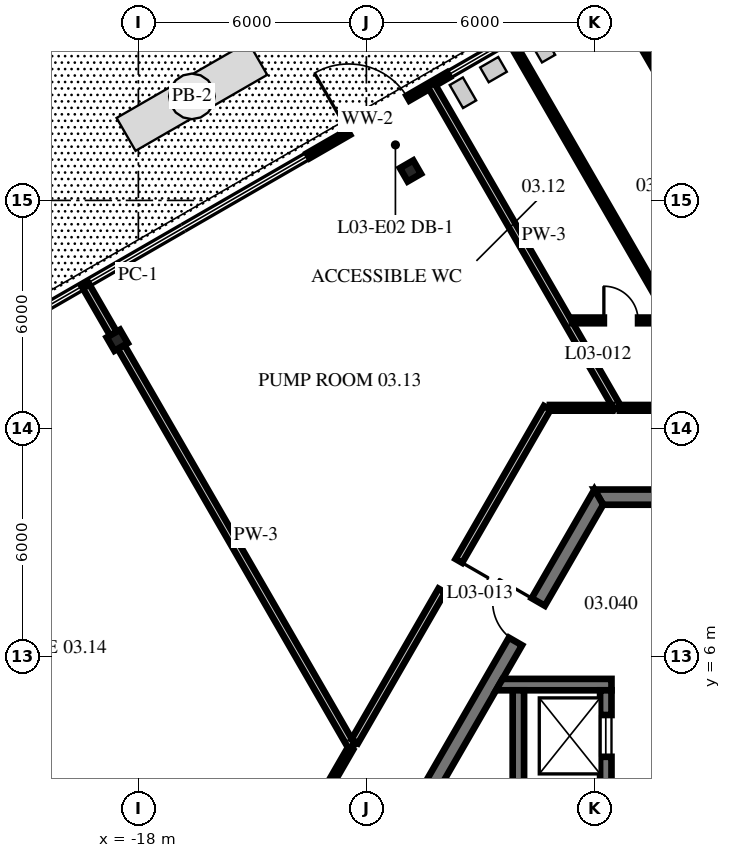
"""IFC4 building model, lengths in metres.
Left out: names, types, materials, properties, quantities, classifications, styles, units other than length and angle.
Written with IfcOpenShell. Run it as: python <this file> out.ifc"""

import sys

from ifc_helpers import new_model, si_unit, direction, frame, frame_2d, origin, origin_2d, place, context, subcontext, project, spatial, polyline, rectangle, i_section, outline, extrude, source, transform, mapped, element, fill, save


model = new_model("IFC4")
c1 = context("Model", 3, precision=1e-05, world=origin(), true_north=direction((0.0, 1.0)))
c2 = subcontext(c1, "Body", "Model", "MODEL_VIEW")
j1 = project(units=[si_unit("LENGTHUNIT", "METRE"), si_unit("PLANEANGLEUNIT", "RADIAN")], contexts=[c1])
p1 = place(None, origin())
s1 = spatial("IfcSite", under=j1, at=p1, CompositionType="ELEMENT")
p2 = place(p1, origin())
s2 = spatial("IfcBuilding", under=s1, at=p2, CompositionType="ELEMENT")
p3 = place(p2, frame((0.0, 0.0, 16.0)))
s3 = spatial("IfcBuildingStorey", under=s2, at=p3, CompositionType="ELEMENT", Elevation=16.0)
m1 = source(origin(), c2, "Body", "SweptSolid", [
    extrude(i_section(OverallWidth=0.404, OverallDepth=0.406, WebThickness=0.027, FlangeThickness=0.044, at=origin_2d()), origin(), (0.0, 0.0, 1.0), 4.3),
])
for number, where, z_axis, x_axis in (
    (1, (-10.84, 18.775, 0.0), (0.0, 0.0, 1.0), (-0.866, -0.5, 0.0)),
    (2, (-18.556, 14.32, 0.0), (0.0, 0.0, 1.0), (-0.866, -0.5, 0.0)),
):
    element("IfcColumn", number, at=place(p3, frame(where, z_axis=z_axis, x_axis=x_axis)), inside=s3, PredefinedType="COLUMN", context=c2, shape_type="MappedRepresentation", body=[
        mapped(m1, transform((0.0, 0.0, 0.0), scale=1.0)),
    ])
m2 = source(origin(), c2, "Body", "SweptSolid", [
    extrude(outline(polyline([(-0.115, -0.2), (11.885, -0.2), (11.654, 0.2), (0.115, 0.2), (-0.115, -0.2)])), origin(), (0.0, 0.0, 1.0), 4.1),
])
p4 = place(p3, frame((5.885, 10.192, 0.0), z_axis=(0.0, 0.0, 1.0), x_axis=(-1.0, 0.0, 0.0)))
e3 = element("IfcWall", 3, at=p4, inside=s3, PredefinedType="SHEAR", context=c2, shape_type="MappedRepresentation", body=[
    mapped(m2, transform((0.0, 0.0, 0.0), scale=1.0)),
])
p5 = place(p4, frame((7.985, 0.0, 0.0)))
e4 = element("IfcOpeningElement", 4, at=p5, cuts=e3, PredefinedType="OPENING", context=c2, shape_type="SweptSolid", body=[
    extrude(rectangle(XDim=1.2, YDim=2.1, at=frame_2d((0.6, 1.05))), frame((0.0, 0.21, 0.0), z_axis=(0.0, -1.0, 0.0), x_axis=(1.0, 0.0, 0.0)), (0.0, 0.0, 1.0), 0.42),
])
p6 = place(p3, frame((-5.885, 10.192, 0.0), z_axis=(0.0, 0.0, 1.0), x_axis=(-0.499996592174, -0.866027371285, 0.0)))
e5 = element("IfcWall", 5, at=p6, inside=s3, PredefinedType="SHEAR", context=c2, shape_type="MappedRepresentation", body=[
    mapped(m2, transform((0.0, 0.0, 0.0), scale=1.0)),
])
p7 = place(p6, frame((3.185, 0.0, 0.0)))
e6 = element("IfcOpeningElement", 6, at=p7, cuts=e5, PredefinedType="OPENING", context=c2, shape_type="SweptSolid", body=[
    extrude(rectangle(XDim=1.2, YDim=2.1, at=frame_2d((0.6, 1.05))), frame((0.0, 0.21, 0.0), z_axis=(0.0, -1.0, 0.0), x_axis=(1.0, 0.0, 0.0)), (0.0, 0.0, 1.0), 0.42),
])
m3 = source(origin(), c2, "Body", "SweptSolid", [
    extrude(outline(polyline([(2.6, -0.15), (-0.44, -0.15), (-0.267, 0.15), (2.6, 0.15), (2.6, -0.15)])), origin(), (0.0, 0.0, 1.0), 4.1),
])
p8 = place(p3, frame((-8.15, 5.26, 0.0), z_axis=(0.0, 0.0, 1.0), x_axis=(1.0, 0.0, 0.0)))
e7 = element("IfcWall", 7, at=p8, inside=s3, PredefinedType="SHEAR", context=c2, shape_type="MappedRepresentation", body=[
    mapped(m3, transform((0.0, 0.0, 0.0), scale=1.0)),
])
m4 = source(origin(), c2, "Body", "SweptSolid", [
    extrude(rectangle(XDim=2.4, YDim=0.3, at=frame_2d((1.2, 0.0))), origin(), (0.0, 0.0, 1.0), 4.1),
])
p9 = place(p3, frame((-8.0, 2.71, 0.0), z_axis=(0.0, 0.0, 1.0), x_axis=(0.0, 1.0, 0.0)))
e8 = element("IfcWall", 8, at=p9, inside=s3, PredefinedType="SHEAR", context=c2, shape_type="MappedRepresentation", body=[
    mapped(m4, transform((0.0, 0.0, 0.0), scale=1.0)),
])
p10 = place(p3, frame((-5.7, 2.71, 0.0), z_axis=(0.0, 0.0, 1.0), x_axis=(0.0, 1.0, 0.0)))
e9 = element("IfcWall", 9, at=p10, inside=s3, PredefinedType="SHEAR", context=c2, shape_type="MappedRepresentation", body=[
    mapped(m4, transform((0.0, 0.0, 0.0), scale=1.0)),
])
p11 = place(p10, frame((0.65, 0.0, 0.0)))
e10 = element("IfcOpeningElement", 10, at=p11, cuts=e9, PredefinedType="OPENING", context=c2, shape_type="SweptSolid", body=[
    extrude(rectangle(XDim=1.1, YDim=2.1, at=frame_2d((0.55, 1.05))), frame((0.0, 0.16, 0.0), z_axis=(0.0, -1.0, 0.0), x_axis=(1.0, 0.0, 0.0)), (0.0, 0.0, 1.0), 0.32),
])
m5 = source(origin(), c2, "Body", "SweptSolid", [
    extrude(rectangle(XDim=4.263, YDim=0.15, at=frame_2d((2.131, 0.0))), origin(), (0.0, 0.0, 1.0), 4.1),
])
p12 = place(p3, frame((-13.531, 19.175, 0.0), z_axis=(0.0, 0.0, 1.0), x_axis=(0.8660282166, 0.499995128029, 0.0)))
e11 = element("IfcWall", 11, at=p12, inside=s3, PredefinedType="ELEMENTEDWALL", context=c2, shape_type="MappedRepresentation", body=[
    mapped(m5, transform((0.0, 0.0, 0.0), scale=1.0)),
])
p13 = place(p12, frame((1.231, 0.0, 0.0)))
e12 = element("IfcOpeningElement", 12, at=p13, cuts=e11, PredefinedType="OPENING", context=c2, shape_type="SweptSolid", body=[
    extrude(rectangle(XDim=1.8, YDim=2.4, at=frame_2d((0.9, 1.2))), frame((0.0, 0.085, 0.0), z_axis=(0.0, -1.0, 0.0), x_axis=(1.0, 0.0, 0.0)), (0.0, 0.0, 1.0), 0.17),
])
m6 = source(origin(), c2, "Body", "SweptSolid", [
    extrude(rectangle(XDim=1.499, YDim=0.2, at=frame_2d((0.749, 0.0))), origin(), (0.0, 0.0, 1.0), 4.1),
])
p14 = place(p3, frame((-19.402, 15.785, 0.0), z_axis=(0.0, 0.0, 1.0), x_axis=(0.499976292358, -0.866039090965, 0.0)))
e13 = element("IfcWall", 13, at=p14, inside=s3, PredefinedType="PARTITIONING", context=c2, shape_type="MappedRepresentation", body=[
    mapped(m6, transform((0.0, 0.0, 0.0), scale=1.0)),
])
m7 = source(origin(), c2, "Body", "SweptSolid", [
    extrude(rectangle(XDim=12.148, YDim=0.2, at=frame_2d((6.074, 0.0))), origin(), (0.0, 0.0, 1.0), 3.343),
])
p15 = place(p3, frame((-18.459, 14.153, 0.0), z_axis=(0.0, 0.0, 1.0), x_axis=(0.500006022464, -0.866021926685, 0.0)))
e14 = element("IfcWall", 14, at=p15, inside=s3, PredefinedType="PARTITIONING", context=c2, shape_type="MappedRepresentation", body=[
    mapped(m7, transform((0.0, 0.0, 0.0), scale=1.0)),
])
m8 = source(origin(), c2, "Body", "SweptSolid", [
    extrude(rectangle(XDim=9.813, YDim=0.2, at=frame_2d((4.906, 0.0))), origin(), (0.0, 0.0, 1.0), 4.1),
])
p16 = place(p3, frame((-10.3, 21.04, 0.0), z_axis=(0.0, 0.0, 1.0), x_axis=(0.49999238347, -0.866029801145, 0.0)))
e15 = element("IfcWall", 15, at=p16, inside=s3, PredefinedType="PARTITIONING", context=c2, shape_type="MappedRepresentation", body=[
    mapped(m8, transform((0.0, 0.0, 0.0), scale=1.0)),
])
p17 = place(p3, frame((-8.222, 22.24, 0.0), z_axis=(0.0, 0.0, 1.0), x_axis=(0.500002832459, -0.866023768457, 0.0)))
e16 = element("IfcWall", 16, at=p17, inside=s3, PredefinedType="PARTITIONING", context=c2, shape_type="SweptSolid", body=[
    extrude(rectangle(XDim=8.542, YDim=0.15, at=frame_2d((4.271, 0.0))), origin(), (0.0, 0.0, 1.0), 4.1),
])
p18 = place(p3, frame((-5.67, 23.713, 0.0), z_axis=(0.0, 0.0, 1.0), x_axis=(0.500017481723, -0.866015310472, 0.0)))
e17 = element("IfcWall", 17, at=p18, inside=s3, PredefinedType="PARTITIONING", context=c2, shape_type="SweptSolid", body=[
    extrude(rectangle(XDim=10.243, YDim=0.15, at=frame_2d((5.122, 0.0))), origin(), (0.0, 0.0, 1.0), 4.1),
])
p19 = place(p3, frame((-7.171, 12.542, 0.0), z_axis=(0.0, 0.0, 1.0), x_axis=(1.0, 0.0, 0.0)))
e18 = element("IfcWall", 18, at=p19, inside=s3, PredefinedType="PARTITIONING", context=c2, shape_type="SweptSolid", body=[
    extrude(rectangle(XDim=1.641, YDim=0.15, at=frame_2d((0.821, 0.0))), origin(), (0.0, 0.0, 1.0), 4.1),
])
p20 = place(p3, frame((-5.33, 12.542, 0.0), z_axis=(0.0, 0.0, 1.0), x_axis=(1.0, 0.0, 0.0)))
e19 = element("IfcWall", 19, at=p20, inside=s3, PredefinedType="PARTITIONING", context=c2, shape_type="SweptSolid", body=[
    extrude(rectangle(XDim=8.244, YDim=0.15, at=frame_2d((4.122, 0.0))), origin(), (0.0, 0.0, 1.0), 4.1),
])
p21 = place(p20, frame((3.727, 0.0, 0.0)))
e20 = element("IfcOpeningElement", 20, at=p21, cuts=e19, PredefinedType="OPENING", context=c2, shape_type="SweptSolid", body=[
    extrude(rectangle(XDim=0.9, YDim=2.1, at=frame_2d((0.45, 1.05))), frame((0.0, 0.085, 0.0), z_axis=(0.0, -1.0, 0.0), x_axis=(1.0, 0.0, 0.0)), (0.0, 0.0, 1.0), 0.17),
])
p22 = place(p3, frame((-6.592, 14.842, 0.0), z_axis=(0.0, 0.0, 1.0), x_axis=(1.0, 0.0, 0.0)))
e21 = element("IfcWall", 21, at=p22, inside=s3, PredefinedType="PARTITIONING", context=c2, shape_type="SweptSolid", body=[
    extrude(rectangle(XDim=8.181, YDim=0.15, at=frame_2d((4.09, 0.0))), origin(), (0.0, 0.0, 1.0), 4.1),
])
p23 = place(p22, frame((6.461, 0.0, 0.0)))
e22 = element("IfcOpeningElement", 22, at=p23, cuts=e21, PredefinedType="OPENING", context=c2, shape_type="SweptSolid", body=[
    extrude(rectangle(XDim=0.9, YDim=2.1, at=frame_2d((0.45, 1.05))), frame((0.0, 0.085, 0.0), z_axis=(0.0, -1.0, 0.0), x_axis=(1.0, 0.0, 0.0)), (0.0, 0.0, 1.0), 0.17),
])
p24 = place(p22, frame((3.893, 0.0, 0.0)))
e23 = element("IfcOpeningElement", 23, at=p24, cuts=e21, PredefinedType="OPENING", context=c2, shape_type="SweptSolid", body=[
    extrude(rectangle(XDim=0.9, YDim=2.1, at=frame_2d((0.45, 1.05))), frame((0.0, 0.085, 0.0), z_axis=(0.0, -1.0, 0.0), x_axis=(1.0, 0.0, 0.0)), (0.0, 0.0, 1.0), 0.17),
])
p25 = place(p22, frame((0.841, 0.0, 0.0)))
e24 = element("IfcOpeningElement", 24, at=p25, cuts=e21, PredefinedType="OPENING", context=c2, shape_type="SweptSolid", body=[
    extrude(rectangle(XDim=0.9, YDim=2.1, at=frame_2d((0.45, 1.05))), frame((0.0, 0.085, 0.0), z_axis=(0.0, -1.0, 0.0), x_axis=(1.0, 0.0, 0.0)), (0.0, 0.0, 1.0), 0.17),
])
p26 = place(p3, frame((-14.473, 0.017, 0.0), z_axis=(0.0, 0.0, 1.0), x_axis=(0.500022314862, 0.866012519909, 0.0)))
e25 = element("IfcWall", 25, at=p26, inside=s3, PredefinedType="PARTITIONING", context=c2, shape_type="SweptSolid", body=[
    extrude(rectangle(XDim=4.111, YDim=0.15, at=frame_2d((2.056, 0.0))), origin(), (0.0, 0.0, 1.0), 4.1),
])
p27 = place(p26, frame((1.625, 0.0, 0.0)))
e26 = element("IfcOpeningElement", 26, at=p27, cuts=e25, PredefinedType="OPENING", context=c2, shape_type="SweptSolid", body=[
    extrude(rectangle(XDim=0.9, YDim=2.1, at=frame_2d((0.45, 1.05))), frame((0.0, 0.085, 0.0), z_axis=(0.0, -1.0, 0.0), x_axis=(1.0, 0.0, 0.0)), (0.0, 0.0, 1.0), 0.17),
])
p28 = place(p3, frame((-12.307, 3.768, 0.0), z_axis=(0.0, 0.0, 1.0), x_axis=(0.500011000363, 0.866019052629, 0.0)))
e27 = element("IfcWall", 27, at=p28, inside=s3, PredefinedType="PARTITIONING", context=c2, shape_type="SweptSolid", body=[
    extrude(rectangle(XDim=10.132, YDim=0.2, at=frame_2d((5.066, 0.0))), origin(), (0.0, 0.0, 1.0), 4.1),
])
p29 = place(p28, frame((4.582, 0.0, 0.0)))
e28 = element("IfcOpeningElement", 28, at=p29, cuts=e27, PredefinedType="OPENING", context=c2, shape_type="SweptSolid", body=[
    extrude(rectangle(XDim=0.9, YDim=2.1, at=frame_2d((0.45, 1.05))), frame((0.0, 0.11, 0.0), z_axis=(0.0, -1.0, 0.0), x_axis=(1.0, 0.0, 0.0)), (0.0, 0.0, 1.0), 0.22),
])
p30 = place(p7, frame((1.2, 0.0, 0.0), z_axis=(0.0, 0.0, 1.0), x_axis=(-1.0, 0.0, 0.0)))
e29 = element("IfcDoor", 29, at=p30, inside=s3, OperationType="SINGLE_SWING_RIGHT", PredefinedType="DOOR", context=c2, shape_type="SweptSolid", body=[
    extrude(rectangle(XDim=1.2, YDim=2.1, at=frame_2d((0.6, 1.05))), frame((0.0, 0.025, 0.0), z_axis=(0.0, -1.0, 0.0), x_axis=(1.0, 0.0, 0.0)), (0.0, 0.0, 1.0), 0.05),
])
fill(e6, e29)
p31 = place(p11, origin())
e30 = element("IfcDoor", 30, at=p31, inside=s3, OperationType="DOUBLE_DOOR_SLIDING", PredefinedType="DOOR", context=c2, shape_type="SweptSolid", body=[
    extrude(rectangle(XDim=1.1, YDim=2.1, at=frame_2d((0.55, 1.05))), frame((0.0, 0.025, 0.0), z_axis=(0.0, -1.0, 0.0), x_axis=(1.0, 0.0, 0.0)), (0.0, 0.0, 1.0), 0.05),
])
fill(e10, e30)
p32 = place(p13, origin())
e31 = element("IfcDoor", 31, at=p32, inside=s3, OperationType="DOUBLE_DOOR_SINGLE_SWING", PredefinedType="DOOR", context=c2, shape_type="SweptSolid", body=[
    extrude(rectangle(XDim=1.8, YDim=2.4, at=frame_2d((0.9, 1.2))), frame((0.0, 0.025, 0.0), z_axis=(0.0, -1.0, 0.0), x_axis=(1.0, 0.0, 0.0)), (0.0, 0.0, 1.0), 0.05),
])
fill(e12, e31)
p33 = place(p25, origin())
e32 = element("IfcDoor", 32, at=p33, inside=s3, OperationType="SINGLE_SWING_LEFT", PredefinedType="DOOR", context=c2, shape_type="SweptSolid", body=[
    extrude(rectangle(XDim=0.9, YDim=2.1, at=frame_2d((0.45, 1.05))), frame((0.0, 0.025, 0.0), z_axis=(0.0, -1.0, 0.0), x_axis=(1.0, 0.0, 0.0)), (0.0, 0.0, 1.0), 0.05),
])
fill(e24, e32)
p34 = place(p29, origin())
e33 = element("IfcDoor", 33, at=p34, inside=s3, OperationType="SINGLE_SWING_RIGHT", PredefinedType="DOOR", context=c2, shape_type="SweptSolid", body=[
    extrude(rectangle(XDim=0.9, YDim=2.1, at=frame_2d((0.45, 1.05))), frame((0.0, 0.025, 0.0), z_axis=(0.0, -1.0, 0.0), x_axis=(1.0, 0.0, 0.0)), (0.0, 0.0, 1.0), 0.05),
])
fill(e28, e33)
save(model, sys.argv[1])
